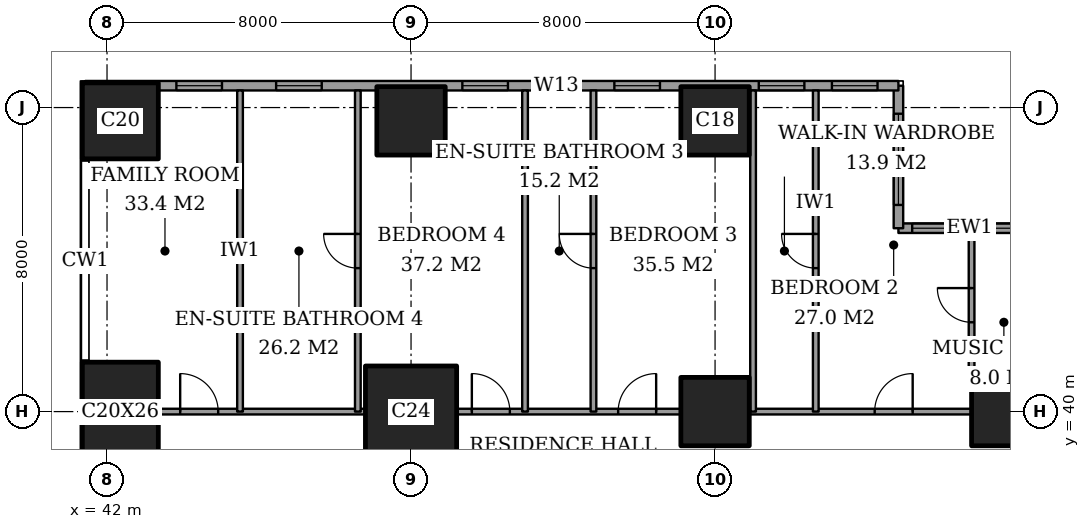
"""IFC4 building model, lengths in metres.
Left out: names, types, materials, properties, quantities, classifications, styles, units other than length and angle.
Written with IfcOpenShell. Run it as: python <this file> out.ifc"""

import sys

from ifc_helpers import new_model, si_unit, direction, frame, frame_2d, origin, origin_2d, place, context, subcontext, project, spatial, rectangle, extrude, element, fill, save


model = new_model("IFC4")
c1 = context("Model", 3, precision=1e-05, world=origin(), true_north=direction((0.0, 1.0)))
c2 = subcontext(c1, "Body", "Model", "MODEL_VIEW")
j1 = project(units=[si_unit("LENGTHUNIT", "METRE"), si_unit("PLANEANGLEUNIT", "RADIAN")], contexts=[c1])
p1 = place(None, origin())
s1 = spatial("IfcSite", under=j1, at=p1, CompositionType="ELEMENT")
p2 = place(p1, origin())
s2 = spatial("IfcBuilding", under=s1, at=p2, CompositionType="ELEMENT")
p3 = place(p2, frame((0.0, 0.0, 214.6)))
s3 = spatial("IfcBuildingStorey", under=s2, at=p3, CompositionType="ELEMENT", Elevation=214.6)
p4 = place(p3, frame((42.35, 40.0, 0.0), z_axis=(0.0, 0.0, 1.0), x_axis=(1.0, 0.0, 0.0)))
e1 = element("IfcColumn", 1, at=p4, inside=s3, PredefinedType="COLUMN", context=c2, shape_type="SweptSolid", body=[
    extrude(rectangle(XDim=2.0, YDim=2.6, at=origin_2d()), origin(), (0.0, 0.0, 1.0), 3.6),
])
p5 = place(p3, frame((42.35, 47.65, 0.0), z_axis=(0.0, 0.0, 1.0), x_axis=(1.0, 0.0, 0.0)))
e2 = element("IfcColumn", 2, at=p5, inside=s3, PredefinedType="COLUMN", context=c2, shape_type="SweptSolid", body=[
    extrude(rectangle(XDim=2.0, YDim=2.0, at=origin_2d()), origin(), (0.0, 0.0, 1.0), 3.6),
])
p6 = place(p3, frame((50.0, 40.0, 0.0), z_axis=(0.0, 0.0, 1.0), x_axis=(1.0, 0.0, 0.0)))
e3 = element("IfcColumn", 3, at=p6, inside=s3, PredefinedType="COLUMN", context=c2, shape_type="SweptSolid", body=[
    extrude(rectangle(XDim=2.4, YDim=2.4, at=origin_2d()), origin(), (0.0, 0.0, 1.0), 3.6),
])
for number, where, z_axis, x_axis in (
    (4, (50.0, 47.65, 0.0), (0.0, 0.0, 1.0), (1.0, 0.0, 0.0)),
    (5, (58.0, 40.0, 0.0), (0.0, 0.0, 1.0), (1.0, 0.0, 0.0)),
    (6, (58.0, 47.65, 0.0), (0.0, 0.0, 1.0), (1.0, 0.0, 0.0)),
    (7, (65.65, 40.0, 0.0), (0.0, 0.0, 1.0), (1.0, 0.0, 0.0)),
):
    element("IfcColumn", number, at=place(p3, frame(where, z_axis=z_axis, x_axis=x_axis)), inside=s3, PredefinedType="COLUMN", context=c2, shape_type="SweptSolid", body=[
        extrude(rectangle(XDim=1.8, YDim=1.8, at=origin_2d()), origin(), (0.0, 0.0, 1.0), 3.6),
    ])
p7 = place(p3, frame((66.575, 44.825, 0.0), z_axis=(0.0, 0.0, 1.0), x_axis=(-1.0, 0.0, 0.0)))
e8 = element("IfcWall", 8, at=p7, inside=s3, PredefinedType="SOLIDWALL", context=c2, shape_type="SweptSolid", body=[
    extrude(rectangle(XDim=3.75, YDim=0.25, at=frame_2d((1.875, 0.0))), origin(), (0.0, 0.0, 1.0), 3.6),
])
p8 = place(p7, frame((0.45, 0.0, 0.2)))
e9 = element("IfcOpeningElement", 9, at=p8, cuts=e8, PredefinedType="OPENING", context=c2, shape_type="SweptSolid", body=[
    extrude(rectangle(XDim=1.2, YDim=2.4, at=frame_2d((0.6, 1.2))), frame((0.0, 0.135, 0.0), z_axis=(0.0, -1.0, 0.0), x_axis=(1.0, 0.0, 0.0)), (0.0, 0.0, 1.0), 0.27),
])
p9 = place(p7, frame((2.188, 0.0, 0.2)))
e10 = element("IfcOpeningElement", 10, at=p9, cuts=e8, PredefinedType="OPENING", context=c2, shape_type="SweptSolid", body=[
    extrude(rectangle(XDim=1.2, YDim=2.4, at=frame_2d((0.6, 1.2))), frame((0.0, 0.135, 0.0), z_axis=(0.0, -1.0, 0.0), x_axis=(1.0, 0.0, 0.0)), (0.0, 0.0, 1.0), 0.27),
])
p10 = place(p3, frame((62.825, 44.825, 0.0), z_axis=(0.0, 0.0, 1.0), x_axis=(0.0, 1.0, 0.0)))
e11 = element("IfcWall", 11, at=p10, inside=s3, PredefinedType="SOLIDWALL", context=c2, shape_type="SweptSolid", body=[
    extrude(rectangle(XDim=3.75, YDim=0.25, at=frame_2d((1.875, 0.0))), origin(), (0.0, 0.0, 1.0), 3.6),
])
p11 = place(p10, frame((0.613, 0.0, 0.2)))
e12 = element("IfcOpeningElement", 12, at=p11, cuts=e11, PredefinedType="OPENING", context=c2, shape_type="SweptSolid", body=[
    extrude(rectangle(XDim=2.4, YDim=2.4, at=frame_2d((1.2, 1.2))), frame((0.0, 0.135, 0.0), z_axis=(0.0, -1.0, 0.0), x_axis=(1.0, 0.0, 0.0)), (0.0, 0.0, 1.0), 0.27),
])
p12 = place(p3, frame((62.825, 48.575, 0.0), z_axis=(0.0, 0.0, 1.0), x_axis=(-1.0, 0.0, 0.0)))
e13 = element("IfcWall", 13, at=p12, inside=s3, PredefinedType="SOLIDWALL", context=c2, shape_type="SweptSolid", body=[
    extrude(rectangle(XDim=21.4, YDim=0.25, at=frame_2d((10.7, 0.0))), origin(), (0.0, 0.0, 1.0), 3.6),
])
p13 = place(p12, frame((0.55, 0.0, 0.2)))
e14 = element("IfcOpeningElement", 14, at=p13, cuts=e13, PredefinedType="OPENING", context=c2, shape_type="SweptSolid", body=[
    extrude(rectangle(XDim=1.2, YDim=2.4, at=frame_2d((0.6, 1.2))), frame((0.0, 0.135, 0.0), z_axis=(0.0, -1.0, 0.0), x_axis=(1.0, 0.0, 0.0)), (0.0, 0.0, 1.0), 0.27),
])
p14 = place(p12, frame((2.475, 0.0, 0.2)))
e15 = element("IfcOpeningElement", 15, at=p14, cuts=e13, PredefinedType="OPENING", context=c2, shape_type="SweptSolid", body=[
    extrude(rectangle(XDim=1.2, YDim=2.4, at=frame_2d((0.6, 1.2))), frame((0.0, 0.135, 0.0), z_axis=(0.0, -1.0, 0.0), x_axis=(1.0, 0.0, 0.0)), (0.0, 0.0, 1.0), 0.27),
])
p15 = place(p12, frame((6.275, 0.0, 0.2)))
e16 = element("IfcOpeningElement", 16, at=p15, cuts=e13, PredefinedType="OPENING", context=c2, shape_type="SweptSolid", body=[
    extrude(rectangle(XDim=1.2, YDim=2.4, at=frame_2d((0.6, 1.2))), frame((0.0, 0.135, 0.0), z_axis=(0.0, -1.0, 0.0), x_axis=(1.0, 0.0, 0.0)), (0.0, 0.0, 1.0), 0.27),
])
p16 = place(p12, frame((8.4, 0.0, 0.2)))
e17 = element("IfcOpeningElement", 17, at=p16, cuts=e13, PredefinedType="OPENING", context=c2, shape_type="SweptSolid", body=[
    extrude(rectangle(XDim=1.2, YDim=2.4, at=frame_2d((0.6, 1.2))), frame((0.0, 0.135, 0.0), z_axis=(0.0, -1.0, 0.0), x_axis=(1.0, 0.0, 0.0)), (0.0, 0.0, 1.0), 0.27),
])
p17 = place(p12, frame((10.275, 0.0, 0.2)))
e18 = element("IfcOpeningElement", 18, at=p17, cuts=e13, PredefinedType="OPENING", context=c2, shape_type="SweptSolid", body=[
    extrude(rectangle(XDim=1.2, YDim=2.4, at=frame_2d((0.6, 1.2))), frame((0.0, 0.135, 0.0), z_axis=(0.0, -1.0, 0.0), x_axis=(1.0, 0.0, 0.0)), (0.0, 0.0, 1.0), 0.27),
])
p18 = place(p12, frame((15.175, 0.0, 0.2)))
e19 = element("IfcOpeningElement", 19, at=p18, cuts=e13, PredefinedType="OPENING", context=c2, shape_type="SweptSolid", body=[
    extrude(rectangle(XDim=1.2, YDim=2.4, at=frame_2d((0.6, 1.2))), frame((0.0, 0.135, 0.0), z_axis=(0.0, -1.0, 0.0), x_axis=(1.0, 0.0, 0.0)), (0.0, 0.0, 1.0), 0.27),
])
p19 = place(p12, frame((17.8, 0.0, 0.2)))
e20 = element("IfcOpeningElement", 20, at=p19, cuts=e13, PredefinedType="OPENING", context=c2, shape_type="SweptSolid", body=[
    extrude(rectangle(XDim=1.2, YDim=2.4, at=frame_2d((0.6, 1.2))), frame((0.0, 0.135, 0.0), z_axis=(0.0, -1.0, 0.0), x_axis=(1.0, 0.0, 0.0)), (0.0, 0.0, 1.0), 0.27),
])
p20 = place(p3, frame((43.35, 40.0, 0.0), z_axis=(0.0, 0.0, 1.0), x_axis=(1.0, 0.0, 0.0)))
e21 = element("IfcWall", 21, at=p20, inside=s3, PredefinedType="PARTITIONING", context=c2, shape_type="SweptSolid", body=[
    extrude(rectangle(XDim=5.45, YDim=0.15, at=frame_2d((2.725, 0.0))), origin(), (0.0, 0.0, 1.0), 3.35),
])
p21 = place(p20, frame((0.575, 0.0, 0.0)))
e22 = element("IfcOpeningElement", 22, at=p21, cuts=e21, PredefinedType="OPENING", context=c2, shape_type="SweptSolid", body=[
    extrude(rectangle(XDim=1.0, YDim=2.1, at=frame_2d((0.5, 1.05))), frame((0.0, 0.085, 0.0), z_axis=(0.0, -1.0, 0.0), x_axis=(1.0, 0.0, 0.0)), (0.0, 0.0, 1.0), 0.17),
])
p22 = place(p3, frame((51.2, 40.0, 0.0), z_axis=(0.0, 0.0, 1.0), x_axis=(1.0, 0.0, 0.0)))
e23 = element("IfcWall", 23, at=p22, inside=s3, PredefinedType="PARTITIONING", context=c2, shape_type="SweptSolid", body=[
    extrude(rectangle(XDim=5.9, YDim=0.15, at=frame_2d((2.95, 0.0))), origin(), (0.0, 0.0, 1.0), 3.35),
])
p23 = place(p22, frame((4.25, 0.0, 0.0)))
e24 = element("IfcOpeningElement", 24, at=p23, cuts=e23, PredefinedType="OPENING", context=c2, shape_type="SweptSolid", body=[
    extrude(rectangle(XDim=1.0, YDim=2.1, at=frame_2d((0.5, 1.05))), frame((0.0, 0.085, 0.0), z_axis=(0.0, -1.0, 0.0), x_axis=(1.0, 0.0, 0.0)), (0.0, 0.0, 1.0), 0.17),
])
p24 = place(p22, frame((0.4, 0.0, 0.0)))
e25 = element("IfcOpeningElement", 25, at=p24, cuts=e23, PredefinedType="OPENING", context=c2, shape_type="SweptSolid", body=[
    extrude(rectangle(XDim=1.0, YDim=2.1, at=frame_2d((0.5, 1.05))), frame((0.0, 0.085, 0.0), z_axis=(0.0, -1.0, 0.0), x_axis=(1.0, 0.0, 0.0)), (0.0, 0.0, 1.0), 0.17),
])
p25 = place(p3, frame((58.9, 40.0, 0.0), z_axis=(0.0, 0.0, 1.0), x_axis=(1.0, 0.0, 0.0)))
e26 = element("IfcWall", 26, at=p25, inside=s3, PredefinedType="PARTITIONING", context=c2, shape_type="SweptSolid", body=[
    extrude(rectangle(XDim=5.85, YDim=0.15, at=frame_2d((2.925, 0.0))), origin(), (0.0, 0.0, 1.0), 3.35),
])
p26 = place(p25, frame((3.3, 0.0, 0.0)))
e27 = element("IfcOpeningElement", 27, at=p26, cuts=e26, PredefinedType="OPENING", context=c2, shape_type="SweptSolid", body=[
    extrude(rectangle(XDim=1.0, YDim=2.1, at=frame_2d((0.5, 1.05))), frame((0.0, 0.085, 0.0), z_axis=(0.0, -1.0, 0.0), x_axis=(1.0, 0.0, 0.0)), (0.0, 0.0, 1.0), 0.17),
])
p27 = place(p3, frame((45.5, 40.0, 0.0), z_axis=(0.0, 0.0, 1.0), x_axis=(0.0, 1.0, 0.0)))
e28 = element("IfcWall", 28, at=p27, inside=s3, PredefinedType="PARTITIONING", context=c2, shape_type="SweptSolid", body=[
    extrude(rectangle(XDim=8.45, YDim=0.15, at=frame_2d((4.225, 0.0))), origin(), (0.0, 0.0, 1.0), 3.35),
])
p28 = place(p3, frame((48.6, 40.0, 0.0), z_axis=(0.0, 0.0, 1.0), x_axis=(0.0, 1.0, 0.0)))
e29 = element("IfcWall", 29, at=p28, inside=s3, PredefinedType="PARTITIONING", context=c2, shape_type="SweptSolid", body=[
    extrude(rectangle(XDim=8.45, YDim=0.15, at=frame_2d((4.225, 0.0))), origin(), (0.0, 0.0, 1.0), 3.35),
])
p29 = place(p28, frame((3.775, 0.0, 0.0)))
e30 = element("IfcOpeningElement", 30, at=p29, cuts=e29, PredefinedType="OPENING", context=c2, shape_type="SweptSolid", body=[
    extrude(rectangle(XDim=0.9, YDim=2.1, at=frame_2d((0.45, 1.05))), frame((0.0, 0.085, 0.0), z_axis=(0.0, -1.0, 0.0), x_axis=(1.0, 0.0, 0.0)), (0.0, 0.0, 1.0), 0.17),
])
p30 = place(p3, frame((53.0, 40.0, 0.0), z_axis=(0.0, 0.0, 1.0), x_axis=(0.0, 1.0, 0.0)))
e31 = element("IfcWall", 31, at=p30, inside=s3, PredefinedType="PARTITIONING", context=c2, shape_type="SweptSolid", body=[
    extrude(rectangle(XDim=8.45, YDim=0.15, at=frame_2d((4.225, 0.0))), origin(), (0.0, 0.0, 1.0), 3.35),
])
p31 = place(p3, frame((54.8, 40.0, 0.0), z_axis=(0.0, 0.0, 1.0), x_axis=(0.0, 1.0, 0.0)))
e32 = element("IfcWall", 32, at=p31, inside=s3, PredefinedType="PARTITIONING", context=c2, shape_type="SweptSolid", body=[
    extrude(rectangle(XDim=8.45, YDim=0.15, at=frame_2d((4.225, 0.0))), origin(), (0.0, 0.0, 1.0), 3.35),
])
p32 = place(p31, frame((3.775, 0.0, 0.0)))
e33 = element("IfcOpeningElement", 33, at=p32, cuts=e32, PredefinedType="OPENING", context=c2, shape_type="SweptSolid", body=[
    extrude(rectangle(XDim=0.9, YDim=2.1, at=frame_2d((0.45, 1.05))), frame((0.0, 0.085, 0.0), z_axis=(0.0, -1.0, 0.0), x_axis=(1.0, 0.0, 0.0)), (0.0, 0.0, 1.0), 0.17),
])
p33 = place(p3, frame((59.0, 40.0, 0.0), z_axis=(0.0, 0.0, 1.0), x_axis=(0.0, 1.0, 0.0)))
e34 = element("IfcWall", 34, at=p33, inside=s3, PredefinedType="PARTITIONING", context=c2, shape_type="SweptSolid", body=[
    extrude(rectangle(XDim=8.45, YDim=0.15, at=frame_2d((4.225, 0.0))), origin(), (0.0, 0.0, 1.0), 3.35),
])
p34 = place(p3, frame((60.65, 40.0, 0.0), z_axis=(0.0, 0.0, 1.0), x_axis=(0.0, 1.0, 0.0)))
e35 = element("IfcWall", 35, at=p34, inside=s3, PredefinedType="PARTITIONING", context=c2, shape_type="SweptSolid", body=[
    extrude(rectangle(XDim=8.45, YDim=0.15, at=frame_2d((4.225, 0.0))), origin(), (0.0, 0.0, 1.0), 3.35),
])
p35 = place(p34, frame((3.775, 0.0, 0.0)))
e36 = element("IfcOpeningElement", 36, at=p35, cuts=e35, PredefinedType="OPENING", context=c2, shape_type="SweptSolid", body=[
    extrude(rectangle(XDim=0.9, YDim=2.1, at=frame_2d((0.45, 1.05))), frame((0.0, 0.085, 0.0), z_axis=(0.0, -1.0, 0.0), x_axis=(1.0, 0.0, 0.0)), (0.0, 0.0, 1.0), 0.17),
])
p36 = place(p3, frame((64.75, 40.9, 0.0), z_axis=(0.0, 0.0, 1.0), x_axis=(0.0, 1.0, 0.0)))
e37 = element("IfcWall", 37, at=p36, inside=s3, PredefinedType="PARTITIONING", context=c2, shape_type="SweptSolid", body=[
    extrude(rectangle(XDim=3.8, YDim=0.15, at=frame_2d((1.9, 0.0))), origin(), (0.0, 0.0, 1.0), 3.35),
])
p37 = place(p36, frame((1.45, 0.0, 0.0)))
e38 = element("IfcOpeningElement", 38, at=p37, cuts=e37, PredefinedType="OPENING", context=c2, shape_type="SweptSolid", body=[
    extrude(rectangle(XDim=0.9, YDim=2.1, at=frame_2d((0.45, 1.05))), frame((0.0, 0.085, 0.0), z_axis=(0.0, -1.0, 0.0), x_axis=(1.0, 0.0, 0.0)), (0.0, 0.0, 1.0), 0.17),
])
p38 = place(p8, origin())
e39 = element("IfcWindow", 39, at=p38, inside=s3, PartitioningType="SINGLE_PANEL", PredefinedType="WINDOW", context=c2, shape_type="SweptSolid", body=[
    extrude(rectangle(XDim=1.2, YDim=2.4, at=frame_2d((0.6, 1.2))), frame((0.0, 0.03, 0.0), z_axis=(0.0, -1.0, 0.0), x_axis=(1.0, 0.0, 0.0)), (0.0, 0.0, 1.0), 0.06),
])
fill(e9, e39)
p39 = place(p9, origin())
e40 = element("IfcWindow", 40, at=p39, inside=s3, PartitioningType="SINGLE_PANEL", PredefinedType="WINDOW", context=c2, shape_type="SweptSolid", body=[
    extrude(rectangle(XDim=1.2, YDim=2.4, at=frame_2d((0.6, 1.2))), frame((0.0, 0.03, 0.0), z_axis=(0.0, -1.0, 0.0), x_axis=(1.0, 0.0, 0.0)), (0.0, 0.0, 1.0), 0.06),
])
fill(e10, e40)
p40 = place(p11, origin())
e41 = element("IfcWindow", 41, at=p40, inside=s3, PartitioningType="SINGLE_PANEL", PredefinedType="WINDOW", context=c2, shape_type="SweptSolid", body=[
    extrude(rectangle(XDim=2.4, YDim=2.4, at=frame_2d((1.2, 1.2))), frame((0.0, 0.03, 0.0), z_axis=(0.0, -1.0, 0.0), x_axis=(1.0, 0.0, 0.0)), (0.0, 0.0, 1.0), 0.06),
])
fill(e12, e41)
p41 = place(p13, origin())
e42 = element("IfcWindow", 42, at=p41, inside=s3, PartitioningType="SINGLE_PANEL", PredefinedType="WINDOW", context=c2, shape_type="SweptSolid", body=[
    extrude(rectangle(XDim=1.2, YDim=2.4, at=frame_2d((0.6, 1.2))), frame((0.0, 0.03, 0.0), z_axis=(0.0, -1.0, 0.0), x_axis=(1.0, 0.0, 0.0)), (0.0, 0.0, 1.0), 0.06),
])
fill(e14, e42)
p42 = place(p14, origin())
e43 = element("IfcWindow", 43, at=p42, inside=s3, PartitioningType="SINGLE_PANEL", PredefinedType="WINDOW", context=c2, shape_type="SweptSolid", body=[
    extrude(rectangle(XDim=1.2, YDim=2.4, at=frame_2d((0.6, 1.2))), frame((0.0, 0.03, 0.0), z_axis=(0.0, -1.0, 0.0), x_axis=(1.0, 0.0, 0.0)), (0.0, 0.0, 1.0), 0.06),
])
fill(e15, e43)
p43 = place(p15, origin())
e44 = element("IfcWindow", 44, at=p43, inside=s3, PartitioningType="SINGLE_PANEL", PredefinedType="WINDOW", context=c2, shape_type="SweptSolid", body=[
    extrude(rectangle(XDim=1.2, YDim=2.4, at=frame_2d((0.6, 1.2))), frame((0.0, 0.03, 0.0), z_axis=(0.0, -1.0, 0.0), x_axis=(1.0, 0.0, 0.0)), (0.0, 0.0, 1.0), 0.06),
])
fill(e16, e44)
p44 = place(p16, origin())
e45 = element("IfcWindow", 45, at=p44, inside=s3, PartitioningType="SINGLE_PANEL", PredefinedType="WINDOW", context=c2, shape_type="SweptSolid", body=[
    extrude(rectangle(XDim=1.2, YDim=2.4, at=frame_2d((0.6, 1.2))), frame((0.0, 0.03, 0.0), z_axis=(0.0, -1.0, 0.0), x_axis=(1.0, 0.0, 0.0)), (0.0, 0.0, 1.0), 0.06),
])
fill(e17, e45)
p45 = place(p17, origin())
e46 = element("IfcWindow", 46, at=p45, inside=s3, PartitioningType="SINGLE_PANEL", PredefinedType="WINDOW", context=c2, shape_type="SweptSolid", body=[
    extrude(rectangle(XDim=1.2, YDim=2.4, at=frame_2d((0.6, 1.2))), frame((0.0, 0.03, 0.0), z_axis=(0.0, -1.0, 0.0), x_axis=(1.0, 0.0, 0.0)), (0.0, 0.0, 1.0), 0.06),
])
fill(e18, e46)
p46 = place(p18, origin())
e47 = element("IfcWindow", 47, at=p46, inside=s3, PartitioningType="SINGLE_PANEL", PredefinedType="WINDOW", context=c2, shape_type="SweptSolid", body=[
    extrude(rectangle(XDim=1.2, YDim=2.4, at=frame_2d((0.6, 1.2))), frame((0.0, 0.03, 0.0), z_axis=(0.0, -1.0, 0.0), x_axis=(1.0, 0.0, 0.0)), (0.0, 0.0, 1.0), 0.06),
])
fill(e19, e47)
p47 = place(p19, origin())
e48 = element("IfcWindow", 48, at=p47, inside=s3, PartitioningType="SINGLE_PANEL", PredefinedType="WINDOW", context=c2, shape_type="SweptSolid", body=[
    extrude(rectangle(XDim=1.2, YDim=2.4, at=frame_2d((0.6, 1.2))), frame((0.0, 0.03, 0.0), z_axis=(0.0, -1.0, 0.0), x_axis=(1.0, 0.0, 0.0)), (0.0, 0.0, 1.0), 0.06),
])
fill(e20, e48)
p48 = place(p37, origin())
e49 = element("IfcDoor", 49, at=p48, inside=s3, OperationType="SINGLE_SWING_LEFT", PredefinedType="DOOR", context=c2, shape_type="SweptSolid", body=[
    extrude(rectangle(XDim=0.9, YDim=2.1, at=frame_2d((0.45, 1.05))), frame((0.0, 0.025, 0.0), z_axis=(0.0, -1.0, 0.0), x_axis=(1.0, 0.0, 0.0)), (0.0, 0.0, 1.0), 0.05),
])
fill(e38, e49)
p49 = place(p26, origin())
e50 = element("IfcDoor", 50, at=p49, inside=s3, OperationType="SINGLE_SWING_LEFT", PredefinedType="DOOR", context=c2, shape_type="SweptSolid", body=[
    extrude(rectangle(XDim=1.0, YDim=2.1, at=frame_2d((0.5, 1.05))), frame((0.0, 0.025, 0.0), z_axis=(0.0, -1.0, 0.0), x_axis=(1.0, 0.0, 0.0)), (0.0, 0.0, 1.0), 0.05),
])
fill(e27, e50)
p50 = place(p35, origin())
e51 = element("IfcDoor", 51, at=p50, inside=s3, OperationType="SINGLE_SWING_LEFT", PredefinedType="DOOR", context=c2, shape_type="SweptSolid", body=[
    extrude(rectangle(XDim=0.9, YDim=2.1, at=frame_2d((0.45, 1.05))), frame((0.0, 0.025, 0.0), z_axis=(0.0, -1.0, 0.0), x_axis=(1.0, 0.0, 0.0)), (0.0, 0.0, 1.0), 0.05),
])
fill(e36, e51)
p51 = place(p23, origin())
e52 = element("IfcDoor", 52, at=p51, inside=s3, OperationType="SINGLE_SWING_LEFT", PredefinedType="DOOR", context=c2, shape_type="SweptSolid", body=[
    extrude(rectangle(XDim=1.0, YDim=2.1, at=frame_2d((0.5, 1.05))), frame((0.0, 0.025, 0.0), z_axis=(0.0, -1.0, 0.0), x_axis=(1.0, 0.0, 0.0)), (0.0, 0.0, 1.0), 0.05),
])
fill(e24, e52)
p52 = place(p32, origin())
e53 = element("IfcDoor", 53, at=p52, inside=s3, OperationType="SINGLE_SWING_LEFT", PredefinedType="DOOR", context=c2, shape_type="SweptSolid", body=[
    extrude(rectangle(XDim=0.9, YDim=2.1, at=frame_2d((0.45, 1.05))), frame((0.0, 0.025, 0.0), z_axis=(0.0, -1.0, 0.0), x_axis=(1.0, 0.0, 0.0)), (0.0, 0.0, 1.0), 0.05),
])
fill(e33, e53)
p53 = place(p24, origin())
e54 = element("IfcDoor", 54, at=p53, inside=s3, OperationType="SINGLE_SWING_RIGHT", PredefinedType="DOOR", context=c2, shape_type="SweptSolid", body=[
    extrude(rectangle(XDim=1.0, YDim=2.1, at=frame_2d((0.5, 1.05))), frame((0.0, 0.025, 0.0), z_axis=(0.0, -1.0, 0.0), x_axis=(1.0, 0.0, 0.0)), (0.0, 0.0, 1.0), 0.05),
])
fill(e25, e54)
p54 = place(p29, origin())
e55 = element("IfcDoor", 55, at=p54, inside=s3, OperationType="SINGLE_SWING_LEFT", PredefinedType="DOOR", context=c2, shape_type="SweptSolid", body=[
    extrude(rectangle(XDim=0.9, YDim=2.1, at=frame_2d((0.45, 1.05))), frame((0.0, 0.025, 0.0), z_axis=(0.0, -1.0, 0.0), x_axis=(1.0, 0.0, 0.0)), (0.0, 0.0, 1.0), 0.05),
])
fill(e30, e55)
p55 = place(p21, origin())
e56 = element("IfcDoor", 56, at=p55, inside=s3, OperationType="SINGLE_SWING_RIGHT", PredefinedType="DOOR", context=c2, shape_type="SweptSolid", body=[
    extrude(rectangle(XDim=1.0, YDim=2.1, at=frame_2d((0.5, 1.05))), frame((0.0, 0.025, 0.0), z_axis=(0.0, -1.0, 0.0), x_axis=(1.0, 0.0, 0.0)), (0.0, 0.0, 1.0), 0.05),
])
fill(e22, e56)
save(model, sys.argv[1])
